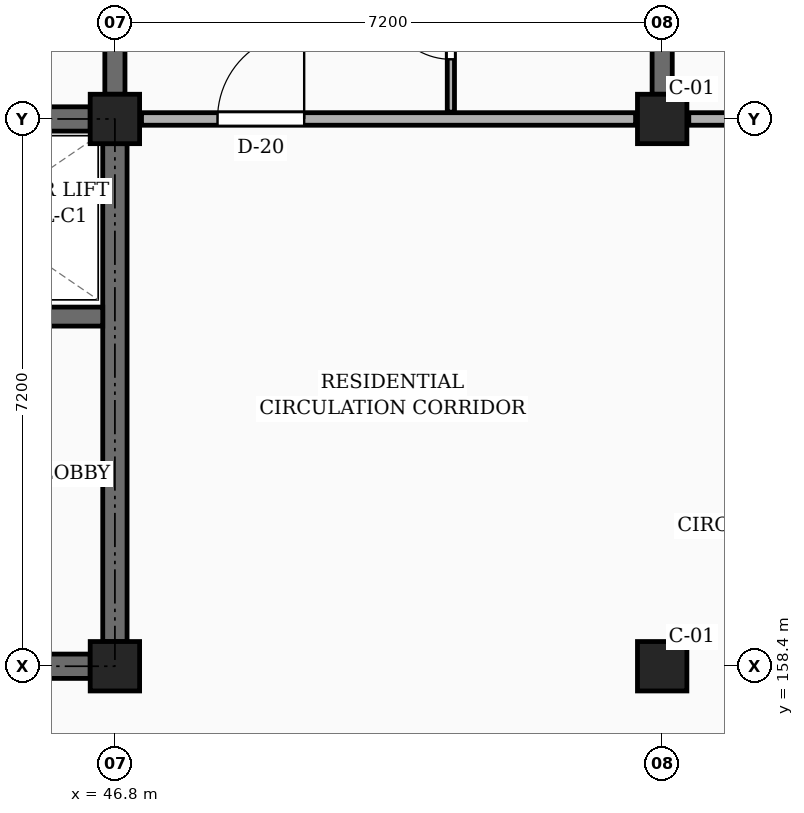
"""IFC4 building model, lengths in metres.
Left out: names, types, materials, properties, quantities, classifications, styles, units other than length and angle.
Written with IfcOpenShell. Run it as: python <this file> out.ifc"""

import sys

from ifc_helpers import new_model, si_unit, direction, frame, frame_2d, origin, origin_2d, place, context, subcontext, project, spatial, rectangle, extrude, element, fill, save


model = new_model("IFC4")
c1 = context("Model", 3, precision=1e-05, world=origin(), true_north=direction((0.0, 1.0)))
c2 = subcontext(c1, "Body", "Model", "MODEL_VIEW")
j1 = project(units=[si_unit("LENGTHUNIT", "METRE"), si_unit("PLANEANGLEUNIT", "RADIAN")], contexts=[c1])
p1 = place(None, origin())
s1 = spatial("IfcSite", under=j1, at=p1, CompositionType="ELEMENT")
p2 = place(p1, origin())
s2 = spatial("IfcBuilding", under=s1, at=p2, CompositionType="ELEMENT")
p3 = place(p2, frame((0.0, 0.0, 4.5)))
s3 = spatial("IfcBuildingStorey", under=s2, at=p3, CompositionType="ELEMENT", Elevation=4.5)
for number, where, z_axis, x_axis in (
    (1, (46.8, 158.4, 0.0), (0.0, 0.0, 1.0), (1.0, 0.0, 0.0)),
    (2, (46.8, 165.6, 0.0), (0.0, 0.0, 1.0), (1.0, 0.0, 0.0)),
    (3, (54.0, 158.4, 0.0), (0.0, 0.0, 1.0), (1.0, 0.0, 0.0)),
    (4, (54.0, 165.6, 0.0), (0.0, 0.0, 1.0), (1.0, 0.0, 0.0)),
):
    element("IfcColumn", number, at=place(p3, frame(where, z_axis=z_axis, x_axis=x_axis)), inside=s3, PredefinedType="COLUMN", context=c2, shape_type="SweptSolid", body=[
        extrude(rectangle(XDim=0.65, YDim=0.65, at=origin_2d()), origin(), (0.0, 0.0, 1.0), 3.15),
    ])
for number, where, z_axis, x_axis in (
    (5, (46.8, 165.925, 0.0), (0.0, 0.0, 1.0), (0.0, 1.0, 0.0)),
    (6, (54.0, 165.925, 0.0), (0.0, 0.0, 1.0), (0.0, 1.0, 0.0)),
):
    element("IfcWall", number, at=place(p3, frame(where, z_axis=z_axis, x_axis=x_axis)), inside=s3, PredefinedType="SOLIDWALL", context=c2, shape_type="SweptSolid", body=[
        extrude(rectangle(XDim=6.575, YDim=0.265, at=frame_2d((3.288, 0.0))), origin(), (0.0, 0.0, 1.0), 2.185),
    ])
p4 = place(p3, frame((39.925, 165.6, 0.0), z_axis=(0.0, 0.0, 1.0), x_axis=(1.0, 0.0, 0.0)))
e7 = element("IfcWall", 7, at=p4, inside=s3, PredefinedType="SHEAR", context=c2, shape_type="SweptSolid", body=[
    extrude(rectangle(XDim=6.55, YDim=0.32, at=frame_2d((3.275, 0.0))), origin(), (0.0, 0.0, 1.0), 2.885),
])
p5 = place(p3, frame((46.8, 158.725, 0.0), z_axis=(0.0, 0.0, 1.0), x_axis=(0.0, 1.0, 0.0)))
e8 = element("IfcWall", 8, at=p5, inside=s3, PredefinedType="SHEAR", context=c2, shape_type="SweptSolid", body=[
    extrude(rectangle(XDim=6.55, YDim=0.32, at=frame_2d((3.275, 0.0))), origin(), (0.0, 0.0, 1.0), 2.885),
])
p6 = place(p3, frame((39.925, 158.4, 0.0), z_axis=(0.0, 0.0, 1.0), x_axis=(1.0, 0.0, 0.0)))
e9 = element("IfcWall", 9, at=p6, inside=s3, PredefinedType="SHEAR", context=c2, shape_type="SweptSolid", body=[
    extrude(rectangle(XDim=6.55, YDim=0.32, at=frame_2d((3.275, 0.0))), origin(), (0.0, 0.0, 1.0), 2.885),
])
p7 = place(p6, frame((4.425, 0.0, 0.0)))
e10 = element("IfcOpeningElement", 10, at=p7, cuts=e9, PredefinedType="OPENING", context=c2, shape_type="SweptSolid", body=[
    extrude(rectangle(XDim=1.1, YDim=2.15, at=frame_2d((0.55, 1.075))), frame((0.0, 0.17, 0.0), z_axis=(0.0, -1.0, 0.0), x_axis=(1.0, 0.0, 0.0)), (0.0, 0.0, 1.0), 0.34),
])
p8 = place(p3, frame((43.325, 163.0, 0.0), z_axis=(0.0, 0.0, 1.0), x_axis=(1.0, 0.0, 0.0)))
e11 = element("IfcWall", 11, at=p8, inside=s3, PredefinedType="SHEAR", context=c2, shape_type="SweptSolid", body=[
    extrude(rectangle(XDim=3.315, YDim=0.25, at=frame_2d((1.657, 0.0))), origin(), (0.0, 0.0, 1.0), 2.885),
])
p9 = place(p8, frame((1.1, 0.0, 0.0)))
e12 = element("IfcOpeningElement", 12, at=p9, cuts=e11, PredefinedType="OPENING", context=c2, shape_type="SweptSolid", body=[
    extrude(rectangle(XDim=1.0, YDim=2.2, at=frame_2d((0.5, 1.1))), frame((0.0, 0.135, 0.0), z_axis=(0.0, -1.0, 0.0), x_axis=(1.0, 0.0, 0.0)), (0.0, 0.0, 1.0), 0.27),
])
p10 = place(p3, frame((47.15, 165.6, 0.0), z_axis=(0.0, 0.0, 1.0), x_axis=(1.0, 0.0, 0.0)))
e13 = element("IfcWall", 13, at=p10, inside=s3, PredefinedType="PARTITIONING", context=c2, shape_type="SweptSolid", body=[
    extrude(rectangle(XDim=6.5, YDim=0.165, at=frame_2d((3.25, 0.0))), origin(), (0.0, 0.0, 1.0), 2.185),
])
p11 = place(p10, frame((1.0, 0.0, 0.0)))
e14 = element("IfcOpeningElement", 14, at=p11, cuts=e13, PredefinedType="OPENING", context=c2, shape_type="SweptSolid", body=[
    extrude(rectangle(XDim=1.14, YDim=2.18, at=frame_2d((0.57, 1.09))), frame((0.0, 0.093, 0.0), z_axis=(0.0, -1.0, 0.0), x_axis=(1.0, 0.0, 0.0)), (0.0, 0.0, 1.0), 0.185),
])
p12 = place(p3, frame((54.35, 165.6, 0.0), z_axis=(0.0, 0.0, 1.0), x_axis=(1.0, 0.0, 0.0)))
e15 = element("IfcWall", 15, at=p12, inside=s3, PredefinedType="PARTITIONING", context=c2, shape_type="SweptSolid", body=[
    extrude(rectangle(XDim=6.5, YDim=0.165, at=frame_2d((3.25, 0.0))), origin(), (0.0, 0.0, 1.0), 2.185),
])
p13 = place(p12, frame((1.0, 0.0, 0.0)))
e16 = element("IfcOpeningElement", 16, at=p13, cuts=e15, PredefinedType="OPENING", context=c2, shape_type="SweptSolid", body=[
    extrude(rectangle(XDim=1.0, YDim=2.15, at=frame_2d((0.5, 1.075))), frame((0.0, 0.093, 0.0), z_axis=(0.0, -1.0, 0.0), x_axis=(1.0, 0.0, 0.0)), (0.0, 0.0, 1.0), 0.185),
])
p14 = place(p3, frame((51.22, 165.69, 0.0), z_axis=(0.0, 0.0, 1.0), x_axis=(0.0, 1.0, 0.0)))
e17 = element("IfcWall", 17, at=p14, inside=s3, PredefinedType="PARTITIONING", context=c2, shape_type="SweptSolid", body=[
    extrude(rectangle(XDim=2.26, YDim=0.095, at=frame_2d((1.13, 0.0))), origin(), (0.0, 0.0, 1.0), 2.32),
])
p15 = place(p14, frame((0.695, 0.0, 0.0)))
e18 = element("IfcOpeningElement", 18, at=p15, cuts=e17, PredefinedType="OPENING", context=c2, shape_type="SweptSolid", body=[
    extrude(rectangle(XDim=0.87, YDim=2.05, at=frame_2d((0.435, 1.025))), frame((0.0, 0.058, 0.0), z_axis=(0.0, -1.0, 0.0), x_axis=(1.0, 0.0, 0.0)), (0.0, 0.0, 1.0), 0.115),
])
p16 = place(p11, origin())
e19 = element("IfcDoor", 19, at=p16, inside=s3, OperationType="SINGLE_SWING_RIGHT", PredefinedType="DOOR", context=c2, shape_type="SweptSolid", body=[
    extrude(rectangle(XDim=1.14, YDim=2.18, at=frame_2d((0.57, 1.09))), frame((0.0, 0.025, 0.0), z_axis=(0.0, -1.0, 0.0), x_axis=(1.0, 0.0, 0.0)), (0.0, 0.0, 1.0), 0.05),
])
fill(e14, e19)
p17 = place(p15, origin())
e20 = element("IfcDoor", 20, at=p17, inside=s3, OperationType="SINGLE_SWING_RIGHT", PredefinedType="DOOR", context=c2, shape_type="SweptSolid", body=[
    extrude(rectangle(XDim=0.87, YDim=2.05, at=frame_2d((0.435, 1.025))), frame((0.0, 0.025, 0.0), z_axis=(0.0, -1.0, 0.0), x_axis=(1.0, 0.0, 0.0)), (0.0, 0.0, 1.0), 0.05),
])
fill(e18, e20)
save(model, sys.argv[1])
